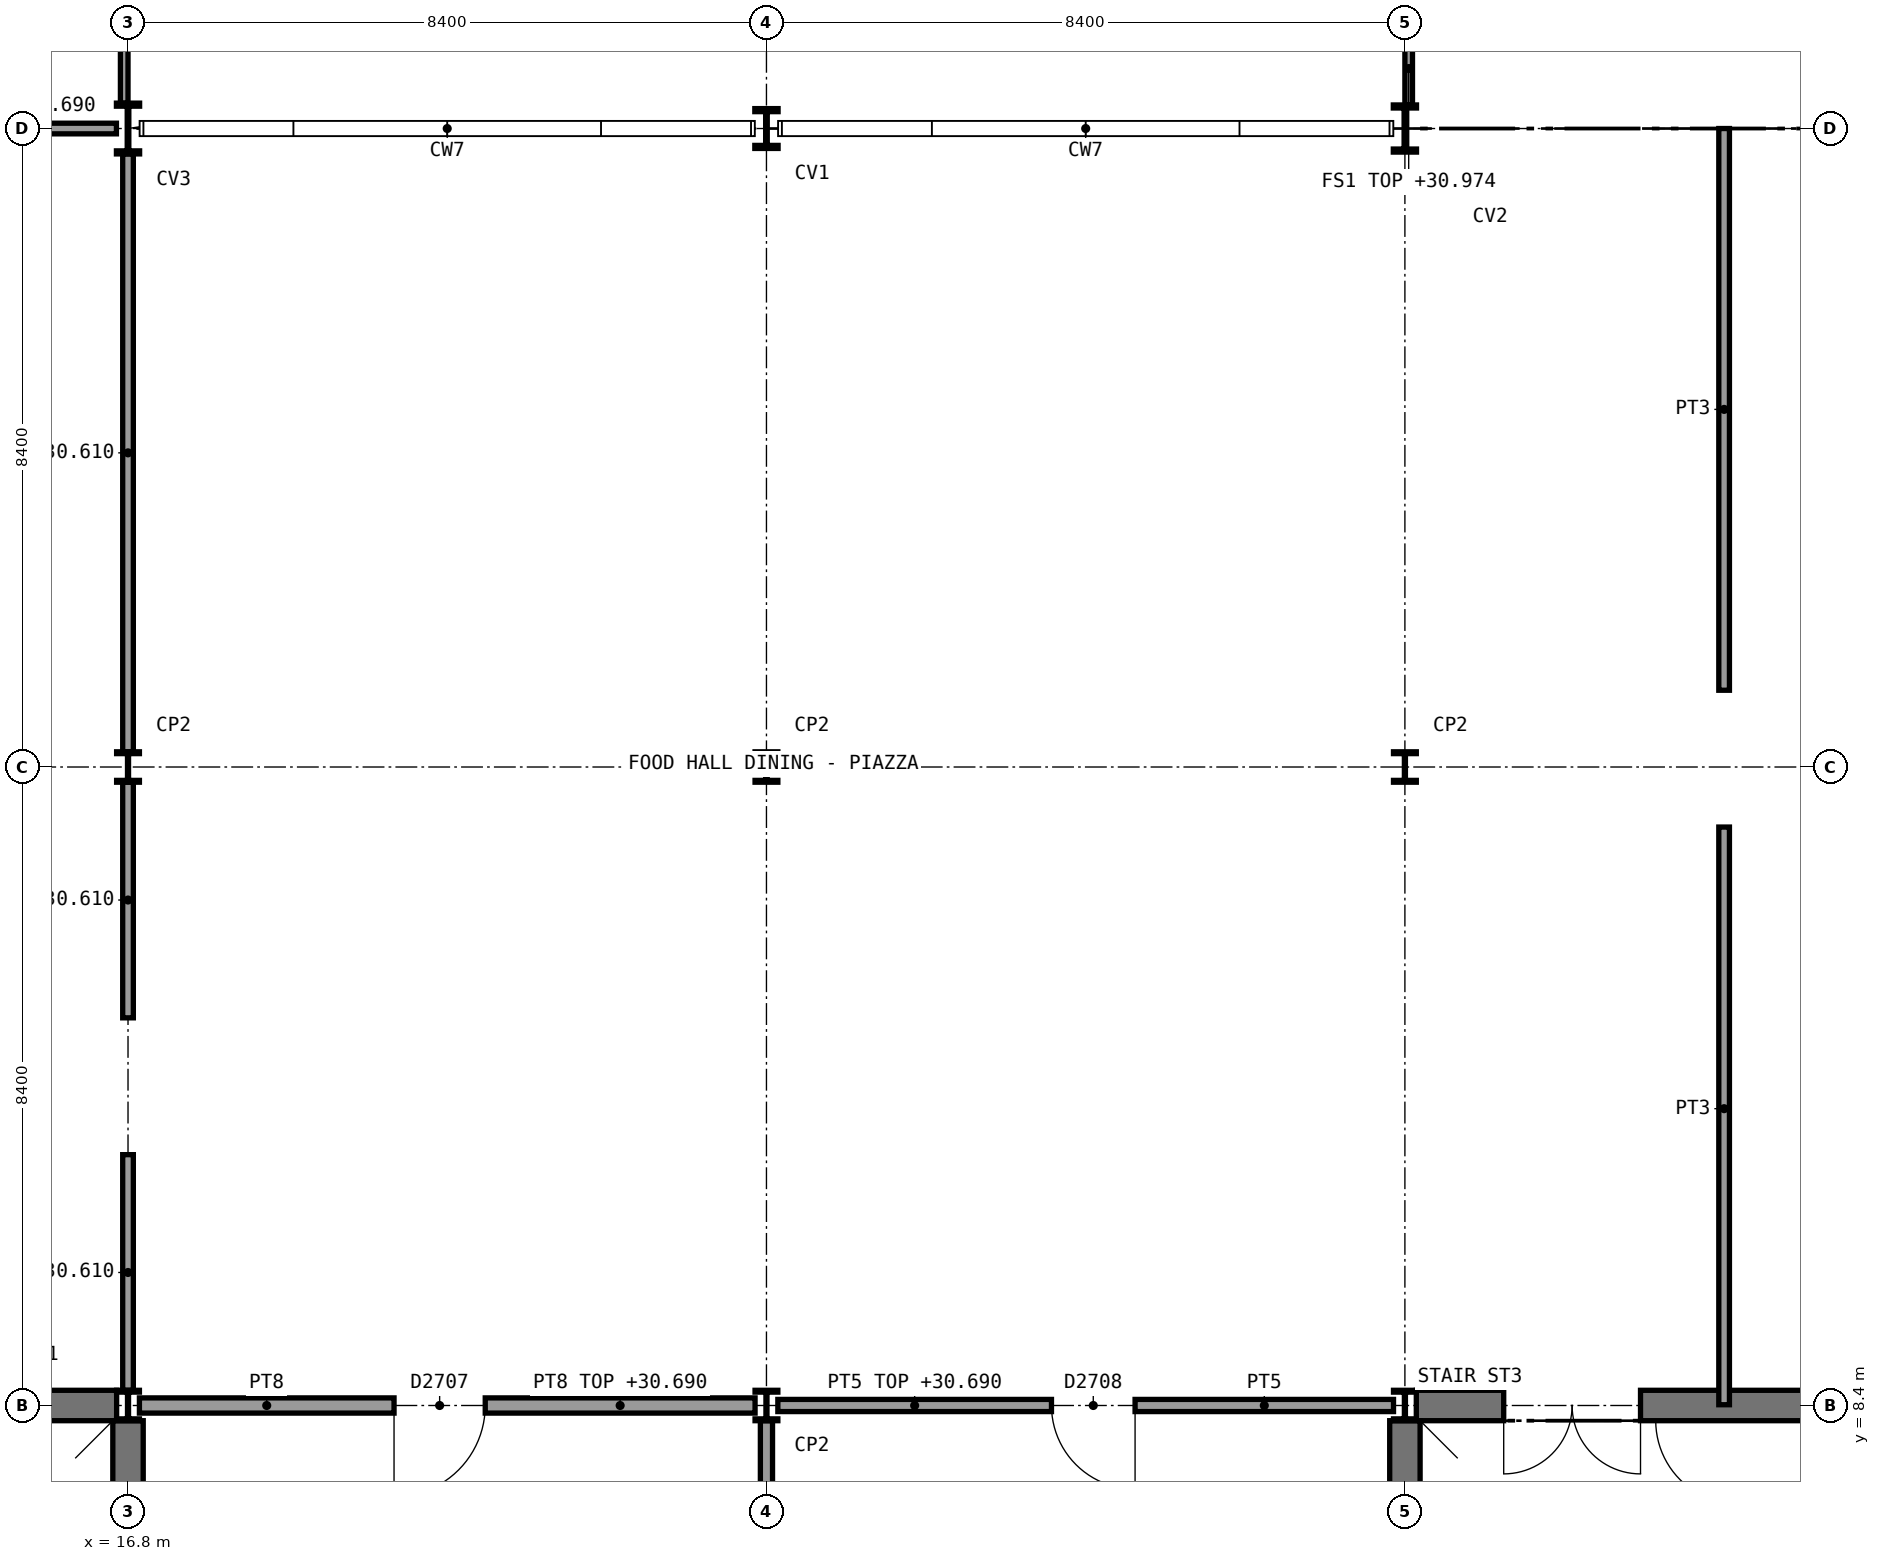
"""IFC4 building model, lengths in metres.
Left out: names, types, materials, properties, quantities, classifications, styles, units other than length and angle.
Written with IfcOpenShell. Run it as: python <this file> out.ifc"""

import sys

from ifc_helpers import new_model, si_unit, direction, frame, frame_2d, origin, origin_2d, place, context, subcontext, project, spatial, rectangle, i_section, extrude, element, fill, save


model = new_model("IFC4")
c1 = context("Model", 3, precision=1e-05, world=origin(), true_north=direction((0.0, 1.0)))
c2 = subcontext(c1, "Body", "Model", "MODEL_VIEW")
j1 = project(units=[si_unit("LENGTHUNIT", "METRE"), si_unit("PLANEANGLEUNIT", "RADIAN")], contexts=[c1])
p1 = place(None, origin())
s1 = spatial("IfcSite", under=j1, at=p1, CompositionType="ELEMENT")
p2 = place(p1, origin())
s2 = spatial("IfcBuilding", under=s1, at=p2, CompositionType="ELEMENT")
p3 = place(p2, frame((0.0, 0.0, 25.8)))
s3 = spatial("IfcBuildingStorey", under=s2, at=p3, CompositionType="ELEMENT", Elevation=25.8)
p4 = place(p3, frame((8.55, 8.4, 0.0), z_axis=(0.0, 0.0, 1.0), x_axis=(1.0, 0.0, 0.0)))
e1 = element("IfcWall", 1, at=p4, inside=s3, PredefinedType="SHEAR", context=c2, shape_type="SweptSolid", body=[
    extrude(rectangle(XDim=8.1, YDim=0.4, at=frame_2d((4.05, 0.0))), origin(), (0.0, 0.0, 1.0), 4.51),
])
p5 = place(p4, frame((1.15, 0.0, 0.0)))
e2 = element("IfcOpeningElement", 2, at=p5, cuts=e1, PredefinedType="OPENING", context=c2, shape_type="SweptSolid", body=[
    extrude(rectangle(XDim=1.8, YDim=2.1, at=frame_2d((0.9, 1.05))), frame((0.0, 0.21, 0.0), z_axis=(0.0, -1.0, 0.0), x_axis=(1.0, 0.0, 0.0)), (0.0, 0.0, 1.0), 0.42),
])
p6 = place(p4, frame((5.3, 0.0, 0.0)))
e3 = element("IfcOpeningElement", 3, at=p6, cuts=e1, PredefinedType="OPENING", context=c2, shape_type="SweptSolid", body=[
    extrude(rectangle(XDim=1.8, YDim=2.1, at=frame_2d((0.9, 1.05))), frame((0.0, 0.21, 0.0), z_axis=(0.0, -1.0, 0.0), x_axis=(1.0, 0.0, 0.0)), (0.0, 0.0, 1.0), 0.42),
])
p7 = place(p3, frame((16.8, 0.2, 0.0), z_axis=(0.0, 0.0, 1.0), x_axis=(0.0, 1.0, 0.0)))
e4 = element("IfcWall", 4, at=p7, inside=s3, PredefinedType="SHEAR", context=c2, shape_type="SweptSolid", body=[
    extrude(rectangle(XDim=8.0, YDim=0.4, at=frame_2d((4.0, 0.0))), origin(), (0.0, 0.0, 1.0), 5.2),
])
p8 = place(p3, frame((33.75, 8.4, 0.0), z_axis=(0.0, 0.0, 1.0), x_axis=(1.0, 0.0, 0.0)))
e5 = element("IfcWall", 5, at=p8, inside=s3, PredefinedType="SHEAR", context=c2, shape_type="SweptSolid", body=[
    extrude(rectangle(XDim=8.1, YDim=0.4, at=frame_2d((4.05, 0.0))), origin(), (0.0, 0.0, 1.0), 4.51),
])
p9 = place(p8, frame((1.15, 0.0, 0.0)))
e6 = element("IfcOpeningElement", 6, at=p9, cuts=e5, PredefinedType="OPENING", context=c2, shape_type="SweptSolid", body=[
    extrude(rectangle(XDim=1.8, YDim=2.1, at=frame_2d((0.9, 1.05))), frame((0.0, 0.21, 0.0), z_axis=(0.0, -1.0, 0.0), x_axis=(1.0, 0.0, 0.0)), (0.0, 0.0, 1.0), 0.42),
])
p10 = place(p8, frame((5.3, 0.0, 0.0)))
e7 = element("IfcOpeningElement", 7, at=p10, cuts=e5, PredefinedType="OPENING", context=c2, shape_type="SweptSolid", body=[
    extrude(rectangle(XDim=1.8, YDim=2.1, at=frame_2d((0.9, 1.05))), frame((0.0, 0.21, 0.0), z_axis=(0.0, -1.0, 0.0), x_axis=(1.0, 0.0, 0.0)), (0.0, 0.0, 1.0), 0.42),
])
p11 = place(p3, frame((33.6, 0.2, 0.0), z_axis=(0.0, 0.0, 1.0), x_axis=(0.0, 1.0, 0.0)))
e8 = element("IfcWall", 8, at=p11, inside=s3, PredefinedType="SHEAR", context=c2, shape_type="SweptSolid", body=[
    extrude(rectangle(XDim=8.0, YDim=0.4, at=frame_2d((4.0, 0.0))), origin(), (0.0, 0.0, 1.0), 5.2),
])
for number, where, z_axis, x_axis in (
    (9, (16.8, 8.4, 0.0), (0.0, 0.0, 1.0), (1.0, 0.0, 0.0)),
    (10, (16.8, 16.8, 0.0), (0.0, 0.0, 1.0), (1.0, 0.0, 0.0)),
):
    element("IfcColumn", number, at=place(p3, frame(where, z_axis=z_axis, x_axis=x_axis)), inside=s3, PredefinedType="COLUMN", context=c2, shape_type="SweptSolid", body=[
        extrude(i_section(OverallWidth=0.3, OverallDepth=0.4, WebThickness=0.013, FlangeThickness=0.024, FilletRadius=0.027, at=origin_2d()), origin(), (0.0, 0.0, 1.0), 5.4),
    ])
p12 = place(p3, frame((16.8, 25.2, 0.0), z_axis=(0.0, 0.0, 1.0), x_axis=(1.0, 0.0, 0.0)))
e11 = element("IfcColumn", 11, at=p12, inside=s3, PredefinedType="COLUMN", context=c2, shape_type="SweptSolid", body=[
    extrude(i_section(OverallWidth=0.305, OverallDepth=0.668, WebThickness=0.021, FlangeThickness=0.04, FilletRadius=0.027, at=origin_2d()), origin(), (0.0, 0.0, 1.0), 5.4),
])
for number, where, z_axis, x_axis in (
    (12, (25.2, 8.4, 0.0), (0.0, 0.0, 1.0), (1.0, 0.0, 0.0)),
    (13, (25.2, 16.8, 0.0), (0.0, 0.0, 1.0), (1.0, 0.0, 0.0)),
):
    element("IfcColumn", number, at=place(p3, frame(where, z_axis=z_axis, x_axis=x_axis)), inside=s3, PredefinedType="COLUMN", context=c2, shape_type="SweptSolid", body=[
        extrude(i_section(OverallWidth=0.3, OverallDepth=0.4, WebThickness=0.013, FlangeThickness=0.024, FilletRadius=0.027, at=origin_2d()), origin(), (0.0, 0.0, 1.0), 5.4),
    ])
p13 = place(p3, frame((25.2, 25.2, 0.0), z_axis=(0.0, 0.0, 1.0), x_axis=(1.0, 0.0, 0.0)))
e14 = element("IfcColumn", 14, at=p13, inside=s3, PredefinedType="COLUMN", context=c2, shape_type="SweptSolid", body=[
    extrude(i_section(OverallWidth=0.306, OverallDepth=0.524, WebThickness=0.021, FlangeThickness=0.04, FilletRadius=0.027, at=origin_2d()), origin(), (0.0, 0.0, 1.0), 5.4),
])
for number, where, z_axis, x_axis in (
    (15, (33.6, 8.4, 0.0), (0.0, 0.0, 1.0), (1.0, 0.0, 0.0)),
    (16, (33.6, 16.8, 0.0), (0.0, 0.0, 1.0), (1.0, 0.0, 0.0)),
):
    element("IfcColumn", number, at=place(p3, frame(where, z_axis=z_axis, x_axis=x_axis)), inside=s3, PredefinedType="COLUMN", context=c2, shape_type="SweptSolid", body=[
        extrude(i_section(OverallWidth=0.3, OverallDepth=0.4, WebThickness=0.013, FlangeThickness=0.024, FilletRadius=0.027, at=origin_2d()), origin(), (0.0, 0.0, 1.0), 5.4),
    ])
p14 = place(p3, frame((33.6, 25.2, 0.0), z_axis=(0.0, 0.0, 1.0), x_axis=(1.0, 0.0, 0.0)))
e17 = element("IfcColumn", 17, at=p14, inside=s3, PredefinedType="COLUMN", context=c2, shape_type="SweptSolid", body=[
    extrude(i_section(OverallWidth=0.305, OverallDepth=0.62, WebThickness=0.021, FlangeThickness=0.04, FilletRadius=0.027, at=origin_2d()), origin(), (0.0, 0.0, 1.0), 5.4),
])
p15 = place(p3, frame((25.2, 0.2, 0.0), z_axis=(0.0, 0.0, 1.0), x_axis=(0.0, 1.0, 0.0)))
e18 = element("IfcWall", 18, at=p15, inside=s3, PredefinedType="PARTITIONING", context=c2, shape_type="SweptSolid", body=[
    extrude(rectangle(XDim=8.0, YDim=0.16, at=frame_2d((4.0, 0.0))), origin(), (0.0, 0.0, 1.0), 4.81),
])
p16 = place(p3, frame((16.95, 8.4, 0.0), z_axis=(0.0, 0.0, 1.0), x_axis=(1.0, 0.0, 0.0)))
e19 = element("IfcWall", 19, at=p16, inside=s3, PredefinedType="SOLIDWALL", context=c2, shape_type="SweptSolid", body=[
    extrude(rectangle(XDim=8.1, YDim=0.2, at=frame_2d((4.05, 0.0))), origin(), (0.0, 0.0, 1.0), 4.89),
])
p17 = place(p16, frame((3.35, 0.0, 0.0)))
e20 = element("IfcOpeningElement", 20, at=p17, cuts=e19, PredefinedType="OPENING", context=c2, shape_type="SweptSolid", body=[
    extrude(rectangle(XDim=1.2, YDim=2.1, at=frame_2d((0.6, 1.05))), frame((0.0, 0.11, 0.0), z_axis=(0.0, -1.0, 0.0), x_axis=(1.0, 0.0, 0.0)), (0.0, 0.0, 1.0), 0.22),
])
p18 = place(p3, frame((25.35, 8.4, 0.0), z_axis=(0.0, 0.0, 1.0), x_axis=(1.0, 0.0, 0.0)))
e21 = element("IfcWall", 21, at=p18, inside=s3, PredefinedType="PARTITIONING", context=c2, shape_type="SweptSolid", body=[
    extrude(rectangle(XDim=8.1, YDim=0.16, at=frame_2d((4.05, 0.0))), origin(), (0.0, 0.0, 1.0), 4.89),
])
p19 = place(p18, frame((3.6, 0.0, 0.0)))
e22 = element("IfcOpeningElement", 22, at=p19, cuts=e21, PredefinedType="OPENING", context=c2, shape_type="SweptSolid", body=[
    extrude(rectangle(XDim=1.1, YDim=2.1, at=frame_2d((0.55, 1.05))), frame((0.0, 0.09, 0.0), z_axis=(0.0, -1.0, 0.0), x_axis=(1.0, 0.0, 0.0)), (0.0, 0.0, 1.0), 0.18),
])
for number, where, z_axis, x_axis in (
    (23, (16.8, 8.6, 0.0), (0.0, 0.0, 1.0), (0.0, 1.0, 0.0)),
    (24, (16.8, 13.5, 0.0), (0.0, 0.0, 1.0), (0.0, 1.0, 0.0)),
):
    element("IfcWall", number, at=place(p3, frame(where, z_axis=z_axis, x_axis=x_axis)), inside=s3, PredefinedType="PARTITIONING", context=c2, shape_type="SweptSolid", body=[
        extrude(rectangle(XDim=3.1, YDim=0.14, at=frame_2d((1.55, 0.0))), origin(), (0.0, 0.0, 1.0), 4.81),
    ])
p20 = place(p3, frame((16.8, 17.0, 0.0), z_axis=(0.0, 0.0, 1.0), x_axis=(0.0, 1.0, 0.0)))
e25 = element("IfcWall", 25, at=p20, inside=s3, PredefinedType="PARTITIONING", context=c2, shape_type="SweptSolid", body=[
    extrude(rectangle(XDim=7.866, YDim=0.14, at=frame_2d((3.933, 0.0))), origin(), (0.0, 0.0, 1.0), 4.81),
])
p21 = place(p3, frame((13.802, 25.2, 0.0), z_axis=(0.0, 0.0, 1.0), x_axis=(1.0, 0.0, 0.0)))
e26 = element("IfcWall", 26, at=p21, inside=s3, PredefinedType="PARTITIONING", context=c2, shape_type="SweptSolid", body=[
    extrude(rectangle(XDim=2.845, YDim=0.14, at=frame_2d((1.422, 0.0))), origin(), (0.0, 0.0, 1.0), 4.89),
])
p22 = place(p3, frame((37.8, 8.41, 0.0), z_axis=(0.0, 0.0, 1.0), x_axis=(0.0, 1.0, 0.0)))
e27 = element("IfcWall", 27, at=p22, inside=s3, PredefinedType="PARTITIONING", context=c2, shape_type="SweptSolid", body=[
    extrude(rectangle(XDim=7.6, YDim=0.14, at=frame_2d((3.8, 0.0))), origin(), (0.0, 0.0, 1.0), 5.2),
])
p23 = place(p3, frame((37.8, 17.81, 0.0), z_axis=(0.0, 0.0, 1.0), x_axis=(0.0, 1.0, 0.0)))
e28 = element("IfcWall", 28, at=p23, inside=s3, PredefinedType="PARTITIONING", context=c2, shape_type="SweptSolid", body=[
    extrude(rectangle(XDim=7.39, YDim=0.14, at=frame_2d((3.695, 0.0))), origin(), (0.0, 0.0, 1.0), 5.2),
])
p24 = place(p3, frame((38.0, 0.2, 0.0), z_axis=(0.0, 0.0, 1.0), x_axis=(0.0, 1.0, 0.0)))
e29 = element("IfcWall", 29, at=p24, inside=s3, PredefinedType="SHEAR", context=c2, shape_type="SweptSolid", body=[
    extrude(rectangle(XDim=8.0, YDim=0.2, at=frame_2d((4.0, 0.0))), origin(), (0.0, 0.0, 1.0), 5.2),
])
p25 = place(p24, frame((6.9, 0.0, 0.0)))
e30 = element("IfcOpeningElement", 30, at=p25, cuts=e29, PredefinedType="OPENING", context=c2, shape_type="SweptSolid", body=[
    extrude(rectangle(XDim=1.11, YDim=2.1, at=frame_2d((0.555, 1.05))), frame((0.0, 0.11, 0.0), z_axis=(0.0, -1.0, 0.0), x_axis=(1.0, 0.0, 0.0)), (0.0, 0.0, 1.0), 0.22),
])
p26 = place(p3, frame((33.65, 25.51, 0.0), z_axis=(0.0, 0.0, 1.0), x_axis=(0.0, 1.0, 0.0)))
e31 = element("IfcWall", 31, at=p26, inside=s3, PredefinedType="PARTITIONING", context=c2, shape_type="SweptSolid", body=[
    extrude(rectangle(XDim=11.98, YDim=0.1, at=frame_2d((5.99, 0.0))), origin(), (0.0, 0.0, 1.0), 5.174),
])
p27 = place(p3, frame((16.75, 25.534, 0.0), z_axis=(0.0, 0.0, 1.0), x_axis=(0.0, 1.0, 0.0)))
e32 = element("IfcWall", 32, at=p27, inside=s3, PredefinedType="PARTITIONING", context=c2, shape_type="SweptSolid", body=[
    extrude(rectangle(XDim=11.932, YDim=0.1, at=frame_2d((5.966, 0.0))), origin(), (0.0, 0.0, 1.0), 4.51),
])
p28 = place(p17, frame((1.2, 0.0, 0.0), z_axis=(0.0, 0.0, 1.0), x_axis=(-1.0, 0.0, 0.0)))
e33 = element("IfcDoor", 33, at=p28, inside=s3, OperationType="SINGLE_SWING_RIGHT", PredefinedType="DOOR", context=c2, shape_type="SweptSolid", body=[
    extrude(rectangle(XDim=1.2, YDim=2.1, at=frame_2d((0.6, 1.05))), frame((0.0, 0.025, 0.0), z_axis=(0.0, -1.0, 0.0), x_axis=(1.0, 0.0, 0.0)), (0.0, 0.0, 1.0), 0.05),
])
fill(e20, e33)
p29 = place(p19, frame((1.1, 0.0, 0.0), z_axis=(0.0, 0.0, 1.0), x_axis=(-1.0, 0.0, 0.0)))
e34 = element("IfcDoor", 34, at=p29, inside=s3, OperationType="SINGLE_SWING_LEFT", PredefinedType="DOOR", context=c2, shape_type="SweptSolid", body=[
    extrude(rectangle(XDim=1.1, YDim=2.1, at=frame_2d((0.55, 1.05))), frame((0.0, 0.025, 0.0), z_axis=(0.0, -1.0, 0.0), x_axis=(1.0, 0.0, 0.0)), (0.0, 0.0, 1.0), 0.05),
])
fill(e22, e34)
p30 = place(p25, origin())
e35 = element("IfcDoor", 35, at=p30, inside=s3, OperationType="SINGLE_SWING_RIGHT", PredefinedType="DOOR", context=c2, shape_type="SweptSolid", body=[
    extrude(rectangle(XDim=1.1, YDim=2.1, at=frame_2d((0.55, 1.05))), frame((0.0, 0.025, 0.0), z_axis=(0.0, -1.0, 0.0), x_axis=(1.0, 0.0, 0.0)), (0.0, 0.0, 1.0), 0.05),
])
fill(e30, e35)
p31 = place(p9, frame((1.8, 0.0, 0.0), z_axis=(0.0, 0.0, 1.0), x_axis=(-1.0, 0.0, 0.0)))
e36 = element("IfcDoor", 36, at=p31, inside=s3, OperationType="DOUBLE_DOOR_SINGLE_SWING", PredefinedType="DOOR", context=c2, shape_type="SweptSolid", body=[
    extrude(rectangle(XDim=1.8, YDim=2.1, at=frame_2d((0.9, 1.05))), frame((0.0, 0.025, 0.0), z_axis=(0.0, -1.0, 0.0), x_axis=(1.0, 0.0, 0.0)), (0.0, 0.0, 1.0), 0.05),
])
fill(e6, e36)
save(model, sys.argv[1])
